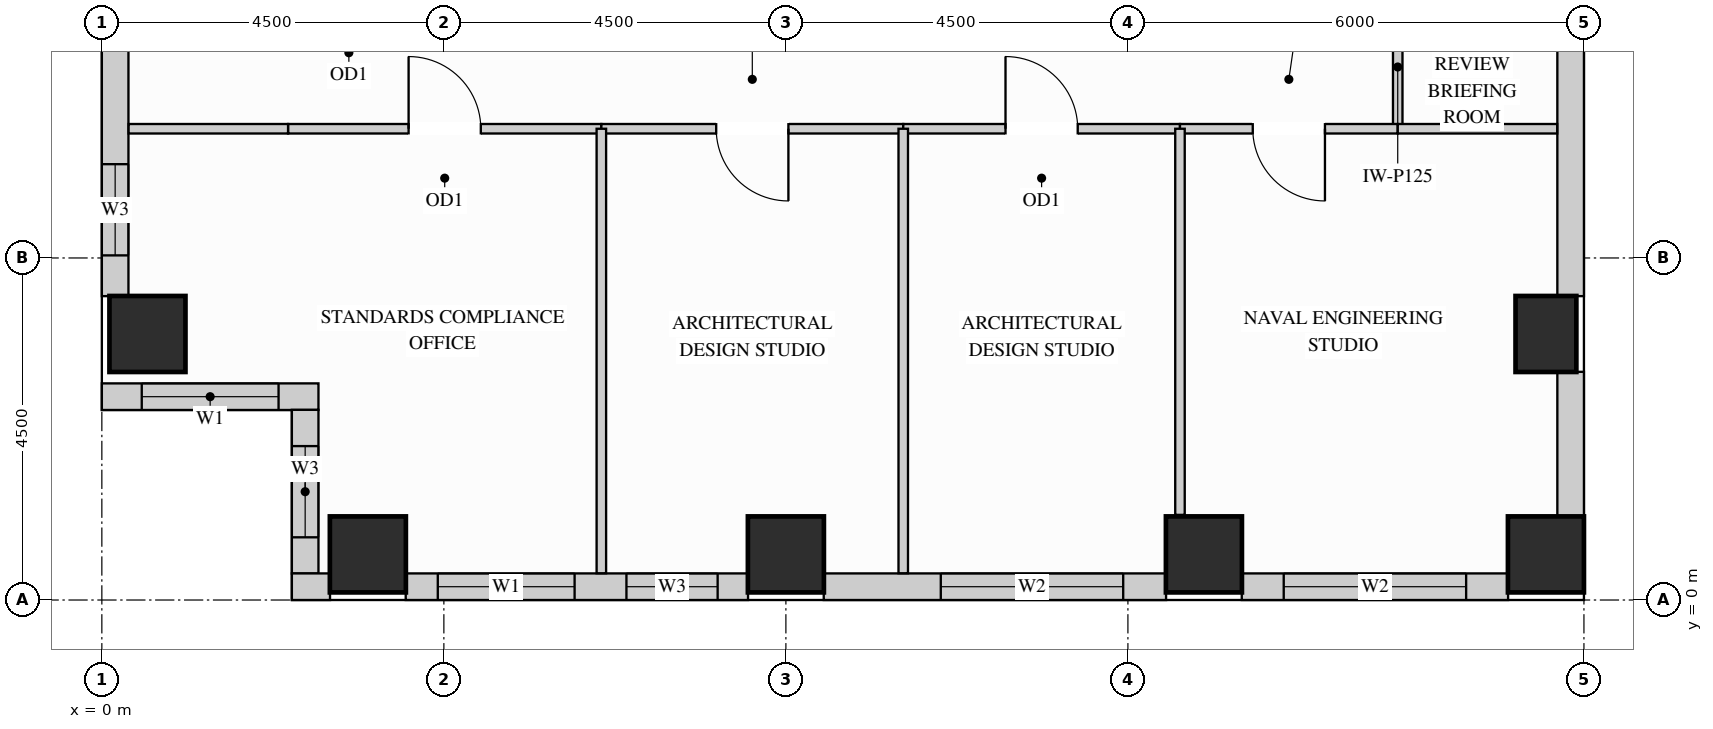
"""IFC4 building model, lengths in metres.
Left out: names, types, materials, properties, quantities, classifications, styles, units other than length and angle.
Written with IfcOpenShell. Run it as: python <this file> out.ifc"""

import sys

from ifc_helpers import new_model, si_unit, direction, frame, frame_2d, origin, origin_2d, place, context, subcontext, project, spatial, rectangle, extrude, source, transform, mapped, element, fill, save


model = new_model("IFC4")
c1 = context("Model", 3, precision=1e-05, world=origin(), true_north=direction((0.0, 1.0)))
c2 = subcontext(c1, "Body", "Model", "MODEL_VIEW")
j1 = project(units=[si_unit("LENGTHUNIT", "METRE"), si_unit("PLANEANGLEUNIT", "RADIAN")], contexts=[c1])
p1 = place(None, origin())
s1 = spatial("IfcSite", under=j1, at=p1, CompositionType="ELEMENT")
p2 = place(p1, origin())
s2 = spatial("IfcBuilding", under=s1, at=p2, CompositionType="ELEMENT")
p3 = place(p2, frame((0.0, 0.0, 200.7)))
s3 = spatial("IfcBuildingStorey", under=s2, at=p3, CompositionType="ELEMENT", Elevation=200.7)
m1 = source(origin(), c2, "Body", "SweptSolid", [
    extrude(rectangle(XDim=0.8, YDim=1.0, at=origin_2d()), origin(), (0.0, 0.0, 1.0), 3.4),
])
p4 = place(p3, frame((19.0, 3.5, 0.0), z_axis=(0.0, 0.0, 1.0), x_axis=(1.0, 0.0, 0.0)))
e1 = element("IfcColumn", 1, at=p4, inside=s3, PredefinedType="COLUMN", context=c2, shape_type="MappedRepresentation", body=[
    mapped(m1, transform((0.0, 0.0, 0.0), x_axis=(1.0, 0.0, 0.0), y_axis=(0.0, 1.0, 0.0), z_axis=(0.0, 0.0, 1.0))),
])
m2 = source(origin(), c2, "Body", "SweptSolid", [
    extrude(rectangle(XDim=1.0, YDim=1.0, at=origin_2d()), origin(), (0.0, 0.0, 1.0), 3.4),
])
for number, where, z_axis, x_axis in (
    (2, (14.5, 0.6, 0.0), (0.0, 0.0, 1.0), (1.0, 0.0, 0.0)),
    (3, (19.0, 0.6, 0.0), (0.0, 0.0, 1.0), (1.0, 0.0, 0.0)),
    (4, (3.5, 0.6, 0.0), (0.0, 0.0, 1.0), (1.0, 0.0, 0.0)),
    (5, (9.0, 0.6, 0.0), (0.0, 0.0, 1.0), (1.0, 0.0, 0.0)),
    (6, (0.6, 3.5, 0.0), (0.0, 0.0, 1.0), (1.0, 0.0, 0.0)),
):
    element("IfcColumn", number, at=place(p3, frame(where, z_axis=z_axis, x_axis=x_axis)), inside=s3, PredefinedType="COLUMN", context=c2, shape_type="MappedRepresentation", body=[
        mapped(m2, transform((0.0, 0.0, 0.0), x_axis=(1.0, 0.0, 0.0), y_axis=(0.0, 1.0, 0.0), z_axis=(0.0, 0.0, 1.0))),
    ])
p5 = place(p3, frame((0.175, 8.002, 0.0), z_axis=(0.0, 0.0, 1.0), x_axis=(0.0, -1.0, 0.0)))
e7 = element("IfcWall", 7, at=p5, inside=s3, PredefinedType="SOLIDWALL", context=c2, shape_type="SweptSolid", body=[
    extrude(rectangle(XDim=4.004, YDim=0.35, at=frame_2d((2.002, 0.0))), origin(), (0.0, 0.0, 1.0), 2.612),
])
p6 = place(p5, frame((2.268, 0.0, 0.78)))
e8 = element("IfcOpeningElement", 8, at=p6, cuts=e7, PredefinedType="OPENING", context=c2, shape_type="SweptSolid", body=[
    extrude(rectangle(XDim=1.2, YDim=1.652, at=frame_2d((0.6, 0.826))), frame((0.0, 0.185, 0.0), z_axis=(0.0, -1.0, 0.0), x_axis=(1.0, 0.0, 0.0)), (0.0, 0.0, 1.0), 0.37),
])
p7 = place(p3, frame((0.0, 2.675, 0.0), z_axis=(0.0, 0.0, 1.0), x_axis=(1.0, 0.0, 0.0)))
e9 = element("IfcWall", 9, at=p7, inside=s3, PredefinedType="SOLIDWALL", context=c2, shape_type="SweptSolid", body=[
    extrude(rectangle(XDim=2.85, YDim=0.35, at=frame_2d((1.425, 0.0))), origin(), (0.0, 0.0, 1.0), 3.385),
])
p8 = place(p7, frame((0.525, 0.0, 0.78)))
e10 = element("IfcOpeningElement", 10, at=p8, cuts=e9, PredefinedType="OPENING", context=c2, shape_type="SweptSolid", body=[
    extrude(rectangle(XDim=1.8, YDim=2.1, at=frame_2d((0.9, 1.05))), frame((0.0, 0.185, 0.0), z_axis=(0.0, -1.0, 0.0), x_axis=(1.0, 0.0, 0.0)), (0.0, 0.0, 1.0), 0.37),
])
p9 = place(p3, frame((2.675, 2.502, 0.0), z_axis=(0.0, 0.0, 1.0), x_axis=(0.0, -1.0, 0.0)))
e11 = element("IfcWall", 11, at=p9, inside=s3, PredefinedType="SOLIDWALL", context=c2, shape_type="SweptSolid", body=[
    extrude(rectangle(XDim=2.154, YDim=0.35, at=frame_2d((1.077, 0.0))), origin(), (0.0, 0.0, 1.0), 3.385),
])
p10 = place(p9, frame((0.477, 0.0, 0.78)))
e12 = element("IfcOpeningElement", 12, at=p10, cuts=e11, PredefinedType="OPENING", context=c2, shape_type="SweptSolid", body=[
    extrude(rectangle(XDim=1.2, YDim=2.1, at=frame_2d((0.6, 1.05))), frame((0.0, 0.185, 0.0), z_axis=(0.0, -1.0, 0.0), x_axis=(1.0, 0.0, 0.0)), (0.0, 0.0, 1.0), 0.37),
])
m3 = source(origin(), c2, "Body", "SweptSolid", [
    extrude(rectangle(XDim=0.502, YDim=0.35, at=frame_2d((0.251, 0.0))), origin(), (0.0, 0.0, 1.0), 3.385),
])
p11 = place(p3, frame((2.5, 0.175, 0.0), z_axis=(0.0, 0.0, 1.0), x_axis=(1.0, 0.0, 0.0)))
e13 = element("IfcWall", 13, at=p11, inside=s3, PredefinedType="SOLIDWALL", context=c2, shape_type="MappedRepresentation", body=[
    mapped(m3, transform((0.0, 0.0, 0.0), x_axis=(1.0, 0.0, 0.0), y_axis=(0.0, 1.0, 0.0), z_axis=(0.0, 0.0, 1.0))),
])
p12 = place(p3, frame((3.998, 0.175, 0.0), z_axis=(0.0, 0.0, 1.0), x_axis=(1.0, 0.0, 0.0)))
e14 = element("IfcWall", 14, at=p12, inside=s3, PredefinedType="SOLIDWALL", context=c2, shape_type="SweptSolid", body=[
    extrude(rectangle(XDim=4.504, YDim=0.35, at=frame_2d((2.252, 0.0))), origin(), (0.0, 0.0, 1.0), 2.612),
])
p13 = place(p12, frame((0.422, 0.0, 0.78)))
e15 = element("IfcOpeningElement", 15, at=p13, cuts=e14, PredefinedType="OPENING", context=c2, shape_type="SweptSolid", body=[
    extrude(rectangle(XDim=1.8, YDim=1.652, at=frame_2d((0.9, 0.826))), frame((0.0, 0.185, 0.0), z_axis=(0.0, -1.0, 0.0), x_axis=(1.0, 0.0, 0.0)), (0.0, 0.0, 1.0), 0.37),
])
p14 = place(p12, frame((2.904, 0.0, 0.78)))
e16 = element("IfcOpeningElement", 16, at=p14, cuts=e14, PredefinedType="OPENING", context=c2, shape_type="SweptSolid", body=[
    extrude(rectangle(XDim=1.2, YDim=1.652, at=frame_2d((0.6, 0.826))), frame((0.0, 0.185, 0.0), z_axis=(0.0, -1.0, 0.0), x_axis=(1.0, 0.0, 0.0)), (0.0, 0.0, 1.0), 0.37),
])
p15 = place(p3, frame((9.498, 0.175, 0.0), z_axis=(0.0, 0.0, 1.0), x_axis=(1.0, 0.0, 0.0)))
e17 = element("IfcWall", 17, at=p15, inside=s3, PredefinedType="SOLIDWALL", context=c2, shape_type="SweptSolid", body=[
    extrude(rectangle(XDim=4.504, YDim=0.35, at=frame_2d((2.252, 0.0))), origin(), (0.0, 0.0, 1.0), 2.612),
])
p16 = place(p15, frame((1.54, 0.0, 0.78)))
e18 = element("IfcOpeningElement", 18, at=p16, cuts=e17, PredefinedType="OPENING", context=c2, shape_type="SweptSolid", body=[
    extrude(rectangle(XDim=2.4, YDim=1.652, at=frame_2d((1.2, 0.826))), frame((0.0, 0.185, 0.0), z_axis=(0.0, -1.0, 0.0), x_axis=(1.0, 0.0, 0.0)), (0.0, 0.0, 1.0), 0.37),
])
p17 = place(p3, frame((14.998, 0.175, 0.0), z_axis=(0.0, 0.0, 1.0), x_axis=(1.0, 0.0, 0.0)))
e19 = element("IfcWall", 19, at=p17, inside=s3, PredefinedType="SOLIDWALL", context=c2, shape_type="SweptSolid", body=[
    extrude(rectangle(XDim=3.504, YDim=0.35, at=frame_2d((1.752, 0.0))), origin(), (0.0, 0.0, 1.0), 2.612),
])
p18 = place(p17, frame((0.552, 0.0, 0.78)))
e20 = element("IfcOpeningElement", 20, at=p18, cuts=e19, PredefinedType="OPENING", context=c2, shape_type="SweptSolid", body=[
    extrude(rectangle(XDim=2.4, YDim=1.652, at=frame_2d((1.2, 0.826))), frame((0.0, 0.185, 0.0), z_axis=(0.0, -1.0, 0.0), x_axis=(1.0, 0.0, 0.0)), (0.0, 0.0, 1.0), 0.37),
])
m4 = source(origin(), c2, "Body", "SweptSolid", [
    extrude(rectangle(XDim=1.904, YDim=0.35, at=frame_2d((0.952, 0.0))), origin(), (0.0, 0.0, 1.0), 2.612),
])
p19 = place(p3, frame((19.325, 1.098, 0.0), z_axis=(0.0, 0.0, 1.0), x_axis=(0.0, 1.0, 0.0)))
e21 = element("IfcWall", 21, at=p19, inside=s3, PredefinedType="SOLIDWALL", context=c2, shape_type="MappedRepresentation", body=[
    mapped(m4, transform((0.0, 0.0, 0.0), x_axis=(1.0, 0.0, 0.0), y_axis=(0.0, 1.0, 0.0), z_axis=(0.0, 0.0, 1.0))),
])
m5 = source(origin(), c2, "Body", "SweptSolid", [
    extrude(rectangle(XDim=4.004, YDim=0.35, at=frame_2d((2.002, 0.0))), origin(), (0.0, 0.0, 1.0), 2.612),
])
p20 = place(p3, frame((19.325, 3.998, 0.0), z_axis=(0.0, 0.0, 1.0), x_axis=(0.0, 1.0, 0.0)))
e22 = element("IfcWall", 22, at=p20, inside=s3, PredefinedType="SOLIDWALL", context=c2, shape_type="MappedRepresentation", body=[
    mapped(m5, transform((0.0, 0.0, 0.0), x_axis=(1.0, 0.0, 0.0), y_axis=(0.0, 1.0, 0.0), z_axis=(0.0, 0.0, 1.0))),
])
p21 = place(p3, frame((17.05, 6.2, 0.0), z_axis=(0.0, 0.0, 1.0), x_axis=(0.0, 1.0, 0.0)))
e23 = element("IfcWall", 23, at=p21, inside=s3, PredefinedType="PARTITIONING", context=c2, shape_type="SweptSolid", body=[
    extrude(rectangle(XDim=4.4, YDim=0.125, at=frame_2d((2.2, 0.0))), origin(), (0.0, 0.0, 1.0), 3.385),
])
p22 = place(p21, frame((1.725, 0.0, 0.0)))
e24 = element("IfcOpeningElement", 24, at=p22, cuts=e23, PredefinedType="OPENING", context=c2, shape_type="SweptSolid", body=[
    extrude(rectangle(XDim=0.95, YDim=2.15, at=frame_2d((0.475, 1.075))), frame((0.0, 0.073, 0.0), z_axis=(0.0, -1.0, 0.0), x_axis=(1.0, 0.0, 0.0)), (0.0, 0.0, 1.0), 0.145),
])
p23 = place(p3, frame((2.45, 6.2, 0.0), z_axis=(0.0, 0.0, 1.0), x_axis=(1.0, 0.0, 0.0)))
e25 = element("IfcWall", 25, at=p23, inside=s3, PredefinedType="PARTITIONING", context=c2, shape_type="SweptSolid", body=[
    extrude(rectangle(XDim=4.122, YDim=0.125, at=frame_2d((2.061, 0.0))), origin(), (0.0, 0.0, 1.0), 2.848),
])
p24 = place(p23, frame((1.586, 0.0, 0.0)))
e26 = element("IfcOpeningElement", 26, at=p24, cuts=e25, PredefinedType="OPENING", context=c2, shape_type="SweptSolid", body=[
    extrude(rectangle(XDim=0.95, YDim=2.15, at=frame_2d((0.475, 1.075))), frame((0.0, 0.073, 0.0), z_axis=(0.0, -1.0, 0.0), x_axis=(1.0, 0.0, 0.0)), (0.0, 0.0, 1.0), 0.145),
])
p25 = place(p3, frame((6.572, 6.2, 0.0), z_axis=(0.0, 0.0, 1.0), x_axis=(1.0, 0.0, 0.0)))
e27 = element("IfcWall", 27, at=p25, inside=s3, PredefinedType="PARTITIONING", context=c2, shape_type="SweptSolid", body=[
    extrude(rectangle(XDim=3.972, YDim=0.125, at=frame_2d((1.986, 0.0))), origin(), (0.0, 0.0, 1.0), 2.848),
])
p26 = place(p25, frame((1.511, 0.0, 0.0)))
e28 = element("IfcOpeningElement", 28, at=p26, cuts=e27, PredefinedType="OPENING", context=c2, shape_type="SweptSolid", body=[
    extrude(rectangle(XDim=0.95, YDim=2.15, at=frame_2d((0.475, 1.075))), frame((0.0, 0.073, 0.0), z_axis=(0.0, -1.0, 0.0), x_axis=(1.0, 0.0, 0.0)), (0.0, 0.0, 1.0), 0.145),
])
p27 = place(p3, frame((10.544, 6.2, 0.0), z_axis=(0.0, 0.0, 1.0), x_axis=(1.0, 0.0, 0.0)))
e29 = element("IfcWall", 29, at=p27, inside=s3, PredefinedType="PARTITIONING", context=c2, shape_type="SweptSolid", body=[
    extrude(rectangle(XDim=3.641, YDim=0.125, at=frame_2d((1.821, 0.0))), origin(), (0.0, 0.0, 1.0), 2.848),
])
p28 = place(p27, frame((1.345, 0.0, 0.0)))
e30 = element("IfcOpeningElement", 30, at=p28, cuts=e29, PredefinedType="OPENING", context=c2, shape_type="SweptSolid", body=[
    extrude(rectangle(XDim=0.95, YDim=2.15, at=frame_2d((0.475, 1.075))), frame((0.0, 0.073, 0.0), z_axis=(0.0, -1.0, 0.0), x_axis=(1.0, 0.0, 0.0)), (0.0, 0.0, 1.0), 0.145),
])
p29 = place(p3, frame((14.185, 6.2, 0.0), z_axis=(0.0, 0.0, 1.0), x_axis=(1.0, 0.0, 0.0)))
e31 = element("IfcWall", 31, at=p29, inside=s3, PredefinedType="PARTITIONING", context=c2, shape_type="SweptSolid", body=[
    extrude(rectangle(XDim=2.865, YDim=0.125, at=frame_2d((1.433, 0.0))), origin(), (0.0, 0.0, 1.0), 2.848),
])
p30 = place(p29, frame((0.958, 0.0, 0.0)))
e32 = element("IfcOpeningElement", 32, at=p30, cuts=e31, PredefinedType="OPENING", context=c2, shape_type="SweptSolid", body=[
    extrude(rectangle(XDim=0.95, YDim=2.15, at=frame_2d((0.475, 1.075))), frame((0.0, 0.073, 0.0), z_axis=(0.0, -1.0, 0.0), x_axis=(1.0, 0.0, 0.0)), (0.0, 0.0, 1.0), 0.145),
])
m6 = source(origin(), c2, "Body", "SweptSolid", [
    extrude(rectangle(XDim=2.098, YDim=0.125, at=frame_2d((1.049, 0.0))), origin(), (0.0, 0.0, 1.0), 2.848),
])
for number, where, z_axis, x_axis in (
    (33, (0.352, 6.2, 0.0), (0.0, 0.0, 1.0), (1.0, 0.0, 0.0)),
    (34, (17.05, 6.2, 0.0), (0.0, 0.0, 1.0), (1.0, 0.0, 0.0)),
):
    element("IfcWall", number, at=place(p3, frame(where, z_axis=z_axis, x_axis=x_axis)), inside=s3, PredefinedType="PARTITIONING", context=c2, shape_type="MappedRepresentation", body=[
        mapped(m6, transform((0.0, 0.0, 0.0), x_axis=(1.0, 0.0, 0.0), y_axis=(0.0, 1.0, 0.0), z_axis=(0.0, 0.0, 1.0))),
    ])
m7 = source(origin(), c2, "Body", "SweptSolid", [
    extrude(rectangle(XDim=5.848, YDim=0.125, at=frame_2d((2.924, 0.0))), origin(), (0.0, 0.0, 1.0), 3.385),
])
for number, where, z_axis, x_axis in (
    (35, (6.572, 0.352, 0.0), (0.0, 0.0, 1.0), (0.0, 1.0, 0.0)),
    (36, (10.544, 0.352, 0.0), (0.0, 0.0, 1.0), (0.0, 1.0, 0.0)),
):
    element("IfcWall", number, at=place(p3, frame(where, z_axis=z_axis, x_axis=x_axis)), inside=s3, PredefinedType="PARTITIONING", context=c2, shape_type="MappedRepresentation", body=[
        mapped(m7, transform((0.0, 0.0, 0.0), x_axis=(1.0, 0.0, 0.0), y_axis=(0.0, 1.0, 0.0), z_axis=(0.0, 0.0, 1.0))),
    ])
m8 = source(origin(), c2, "Body", "SweptSolid", [
    extrude(rectangle(XDim=5.08, YDim=0.125, at=frame_2d((2.54, 0.0))), origin(), (0.0, 0.0, 1.0), 3.385),
])
p31 = place(p3, frame((14.185, 1.12, 0.0), z_axis=(0.0, 0.0, 1.0), x_axis=(0.0, 1.0, 0.0)))
e37 = element("IfcWall", 37, at=p31, inside=s3, PredefinedType="PARTITIONING", context=c2, shape_type="MappedRepresentation", body=[
    mapped(m8, transform((0.0, 0.0, 0.0), x_axis=(1.0, 0.0, 0.0), y_axis=(0.0, 1.0, 0.0), z_axis=(0.0, 0.0, 1.0))),
])
m9 = source(origin(), c2, "Body", "SweptSolid", [
    extrude(rectangle(XDim=0.95, YDim=2.15, at=frame_2d((0.475, 1.075))), frame((0.0, 0.025, 0.0), z_axis=(0.0, -1.0, 0.0), x_axis=(1.0, 0.0, 0.0)), (0.0, 0.0, 1.0), 0.05),
])
p32 = place(p24, origin())
e38 = element("IfcDoor", 38, at=p32, inside=s3, OperationType="SINGLE_SWING_LEFT", PredefinedType="DOOR", context=c2, shape_type="MappedRepresentation", body=[
    mapped(m9, transform((0.0, 0.0, 0.0), x_axis=(1.0, 0.0, 0.0), y_axis=(0.0, 1.0, 0.0), z_axis=(0.0, 0.0, 1.0))),
])
fill(e26, e38)
p33 = place(p26, origin())
e39 = element("IfcDoor", 39, at=p33, inside=s3, OperationType="SINGLE_SWING_RIGHT", PredefinedType="DOOR", context=c2, shape_type="MappedRepresentation", body=[
    mapped(m9, transform((0.0, 0.0, 0.0), x_axis=(1.0, 0.0, 0.0), y_axis=(0.0, 1.0, 0.0), z_axis=(0.0, 0.0, 1.0))),
])
fill(e28, e39)
p34 = place(p28, origin())
e40 = element("IfcDoor", 40, at=p34, inside=s3, OperationType="SINGLE_SWING_LEFT", PredefinedType="DOOR", context=c2, shape_type="MappedRepresentation", body=[
    mapped(m9, transform((0.0, 0.0, 0.0), x_axis=(1.0, 0.0, 0.0), y_axis=(0.0, 1.0, 0.0), z_axis=(0.0, 0.0, 1.0))),
])
fill(e30, e40)
p35 = place(p30, origin())
e41 = element("IfcDoor", 41, at=p35, inside=s3, OperationType="SINGLE_SWING_RIGHT", PredefinedType="DOOR", context=c2, shape_type="MappedRepresentation", body=[
    mapped(m9, transform((0.0, 0.0, 0.0), x_axis=(1.0, 0.0, 0.0), y_axis=(0.0, 1.0, 0.0), z_axis=(0.0, 0.0, 1.0))),
])
fill(e32, e41)
m10 = source(origin(), c2, "Body", "SweptSolid", [
    extrude(rectangle(XDim=1.8, YDim=2.1, at=frame_2d((0.9, 1.05))), frame((0.0, 0.03, 0.0), z_axis=(0.0, -1.0, 0.0), x_axis=(1.0, 0.0, 0.0)), (0.0, 0.0, 1.0), 0.06),
])
p36 = place(p8, origin())
e42 = element("IfcWindow", 42, at=p36, inside=s3, PartitioningType="SINGLE_PANEL", PredefinedType="WINDOW", context=c2, shape_type="MappedRepresentation", body=[
    mapped(m10, transform((0.0, 0.0, 0.0), x_axis=(1.0, 0.0, 0.0), y_axis=(0.0, 1.0, 0.0), z_axis=(0.0, 0.0, 1.0))),
])
fill(e10, e42)
m11 = source(origin(), c2, "Body", "SweptSolid", [
    extrude(rectangle(XDim=1.8, YDim=1.652, at=frame_2d((0.9, 0.826))), frame((0.0, 0.03, 0.0), z_axis=(0.0, -1.0, 0.0), x_axis=(1.0, 0.0, 0.0)), (0.0, 0.0, 1.0), 0.06),
])
p37 = place(p13, origin())
e43 = element("IfcWindow", 43, at=p37, inside=s3, PartitioningType="SINGLE_PANEL", PredefinedType="WINDOW", context=c2, shape_type="MappedRepresentation", body=[
    mapped(m11, transform((0.0, 0.0, 0.0), x_axis=(1.0, 0.0, 0.0), y_axis=(0.0, 1.0, 0.0), z_axis=(0.0, 0.0, 1.0))),
])
fill(e15, e43)
m12 = source(origin(), c2, "Body", "SweptSolid", [
    extrude(rectangle(XDim=2.4, YDim=1.652, at=frame_2d((1.2, 0.826))), frame((0.0, 0.03, 0.0), z_axis=(0.0, -1.0, 0.0), x_axis=(1.0, 0.0, 0.0)), (0.0, 0.0, 1.0), 0.06),
])
p38 = place(p16, origin())
e44 = element("IfcWindow", 44, at=p38, inside=s3, PartitioningType="SINGLE_PANEL", PredefinedType="WINDOW", context=c2, shape_type="MappedRepresentation", body=[
    mapped(m12, transform((0.0, 0.0, 0.0), x_axis=(1.0, 0.0, 0.0), y_axis=(0.0, 1.0, 0.0), z_axis=(0.0, 0.0, 1.0))),
])
fill(e18, e44)
p39 = place(p18, origin())
e45 = element("IfcWindow", 45, at=p39, inside=s3, PartitioningType="SINGLE_PANEL", PredefinedType="WINDOW", context=c2, shape_type="MappedRepresentation", body=[
    mapped(m12, transform((0.0, 0.0, 0.0), x_axis=(1.0, 0.0, 0.0), y_axis=(0.0, 1.0, 0.0), z_axis=(0.0, 0.0, 1.0))),
])
fill(e20, e45)
m13 = source(origin(), c2, "Body", "SweptSolid", [
    extrude(rectangle(XDim=1.2, YDim=1.652, at=frame_2d((0.6, 0.826))), frame((0.0, 0.03, 0.0), z_axis=(0.0, -1.0, 0.0), x_axis=(1.0, 0.0, 0.0)), (0.0, 0.0, 1.0), 0.06),
])
p40 = place(p6, origin())
e46 = element("IfcWindow", 46, at=p40, inside=s3, PartitioningType="SINGLE_PANEL", PredefinedType="WINDOW", context=c2, shape_type="MappedRepresentation", body=[
    mapped(m13, transform((0.0, 0.0, 0.0), x_axis=(1.0, 0.0, 0.0), y_axis=(0.0, 1.0, 0.0), z_axis=(0.0, 0.0, 1.0))),
])
fill(e8, e46)
m14 = source(origin(), c2, "Body", "SweptSolid", [
    extrude(rectangle(XDim=1.2, YDim=2.1, at=frame_2d((0.6, 1.05))), frame((0.0, 0.03, 0.0), z_axis=(0.0, -1.0, 0.0), x_axis=(1.0, 0.0, 0.0)), (0.0, 0.0, 1.0), 0.06),
])
p41 = place(p10, origin())
e47 = element("IfcWindow", 47, at=p41, inside=s3, PartitioningType="SINGLE_PANEL", PredefinedType="WINDOW", context=c2, shape_type="MappedRepresentation", body=[
    mapped(m14, transform((0.0, 0.0, 0.0), x_axis=(1.0, 0.0, 0.0), y_axis=(0.0, 1.0, 0.0), z_axis=(0.0, 0.0, 1.0))),
])
fill(e12, e47)
p42 = place(p14, origin())
e48 = element("IfcWindow", 48, at=p42, inside=s3, PartitioningType="SINGLE_PANEL", PredefinedType="WINDOW", context=c2, shape_type="MappedRepresentation", body=[
    mapped(m13, transform((0.0, 0.0, 0.0), x_axis=(1.0, 0.0, 0.0), y_axis=(0.0, 1.0, 0.0), z_axis=(0.0, 0.0, 1.0))),
])
fill(e16, e48)
save(model, sys.argv[1])
